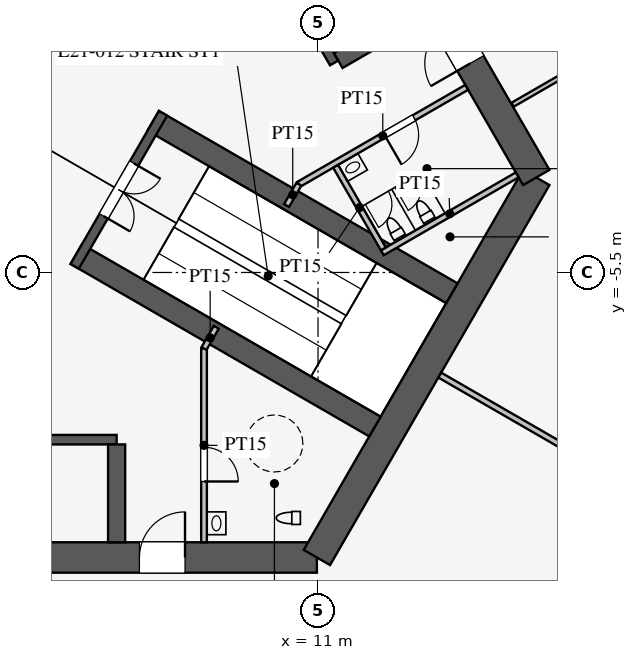
"""IFC4 building model, lengths in metres.
Left out: names, types, materials, properties, quantities, classifications, styles, units other than length and angle.
Written with IfcOpenShell. Run it as: python <this file> out.ifc"""

import sys

from ifc_helpers import new_model, si_unit, direction, frame, frame_2d, origin, place, context, subcontext, project, spatial, rectangle, extrude, element, fill, save


model = new_model("IFC4")
c1 = context("Model", 3, precision=1e-05, world=origin(), true_north=direction((0.0, 1.0)))
c2 = subcontext(c1, "Body", "Model", "MODEL_VIEW")
j1 = project(units=[si_unit("LENGTHUNIT", "METRE"), si_unit("PLANEANGLEUNIT", "RADIAN")], contexts=[c1])
p1 = place(None, origin())
s1 = spatial("IfcSite", under=j1, at=p1, CompositionType="ELEMENT")
p2 = place(p1, origin())
s2 = spatial("IfcBuilding", under=s1, at=p2, CompositionType="ELEMENT")
p3 = place(p2, frame((0.0, 0.0, 92.1)))
s3 = spatial("IfcBuildingStorey", under=s2, at=p3, CompositionType="ELEMENT", Elevation=92.1)
p4 = place(p3, frame((-10.97, -13.0, 0.0), z_axis=(0.0, 0.0, 1.0), x_axis=(1.0, 0.0, 0.0)))
e1 = element("IfcWall", 1, at=p4, inside=s3, PredefinedType="SHEAR", context=c2, shape_type="SweptSolid", body=[
    extrude(rectangle(XDim=21.939, YDim=0.8, at=frame_2d((10.97, 0.0))), origin(), (0.0, 0.0, 1.0), 6.0),
])
p5 = place(p4, frame((17.27, 0.0, 0.0)))
e2 = element("IfcOpeningElement", 2, at=p5, cuts=e1, PredefinedType="OPENING", context=c2, shape_type="SweptSolid", body=[
    extrude(rectangle(XDim=1.2, YDim=2.1, at=frame_2d((0.6, 1.05))), frame((0.0, 0.41, 0.0), z_axis=(0.0, -1.0, 0.0), x_axis=(1.0, 0.0, 0.0)), (0.0, 0.0, 1.0), 0.82),
])
p6 = place(p4, frame((3.47, 0.0, 0.0)))
e3 = element("IfcOpeningElement", 3, at=p6, cuts=e1, PredefinedType="OPENING", context=c2, shape_type="SweptSolid", body=[
    extrude(rectangle(XDim=1.2, YDim=2.1, at=frame_2d((0.6, 1.05))), frame((0.0, 0.41, 0.0), z_axis=(0.0, -1.0, 0.0), x_axis=(1.0, 0.0, 0.0)), (0.0, 0.0, 1.0), 0.82),
])
p7 = place(p3, frame((10.97, -13.0, 0.0), z_axis=(0.0, 0.0, 1.0), x_axis=(0.499995765644, 0.866027848477, 0.0)))
e4 = element("IfcWall", 4, at=p7, inside=s3, PredefinedType="SHEAR", context=c2, shape_type="SweptSolid", body=[
    extrude(rectangle(XDim=11.547, YDim=0.8, at=frame_2d((5.773, 0.0))), origin(), (0.0, 0.0, 1.0), 6.0),
])
p8 = place(p3, frame((16.743, -3.0, 0.0), z_axis=(0.0, 0.0, 1.0), x_axis=(-0.500002442456, 0.866023993627, 0.0)))
e5 = element("IfcWall", 5, at=p8, inside=s3, PredefinedType="SHEAR", context=c2, shape_type="SweptSolid", body=[
    extrude(rectangle(XDim=21.939, YDim=0.8, at=frame_2d((10.97, 0.0))), origin(), (0.0, 0.0, 1.0), 6.0),
])
p9 = place(p8, frame((17.27, 0.0, 0.0)))
e6 = element("IfcOpeningElement", 6, at=p9, cuts=e5, PredefinedType="OPENING", context=c2, shape_type="SweptSolid", body=[
    extrude(rectangle(XDim=1.2, YDim=2.1, at=frame_2d((0.6, 1.05))), frame((0.0, 0.41, 0.0), z_axis=(0.0, -1.0, 0.0), x_axis=(1.0, 0.0, 0.0)), (0.0, 0.0, 1.0), 0.82),
])
p10 = place(p8, frame((3.47, 0.0, 0.0)))
e7 = element("IfcOpeningElement", 7, at=p10, cuts=e5, PredefinedType="OPENING", context=c2, shape_type="SweptSolid", body=[
    extrude(rectangle(XDim=1.2, YDim=2.1, at=frame_2d((0.6, 1.05))), frame((0.0, 0.41, 0.0), z_axis=(0.0, -1.0, 0.0), x_axis=(1.0, 0.0, 0.0)), (0.0, 0.0, 1.0), 0.82),
])
p11 = place(p3, frame((-5.7, -9.9, 0.0), z_axis=(0.0, 0.0, 1.0), x_axis=(1.0, 0.0, 0.0)))
e8 = element("IfcWall", 8, at=p11, inside=s3, PredefinedType="SHEAR", context=c2, shape_type="SweptSolid", body=[
    extrude(rectangle(XDim=11.4, YDim=0.25, at=frame_2d((5.7, 0.0))), origin(), (0.0, 0.0, 1.0), 6.0),
])
p12 = place(p3, frame((5.7, -10.025, 0.0), z_axis=(0.0, 0.0, 1.0), x_axis=(0.0, -1.0, 0.0)))
e9 = element("IfcWall", 9, at=p12, inside=s3, PredefinedType="SHEAR", context=c2, shape_type="SweptSolid", body=[
    extrude(rectangle(XDim=2.575, YDim=0.45, at=frame_2d((1.288, 0.0))), origin(), (0.0, 0.0, 1.0), 6.0),
])
p13 = place(p3, frame((11.424, 0.014, 0.0), z_axis=(0.0, 0.0, 1.0), x_axis=(-0.500001763848, 0.866024385424, 0.0)))
e10 = element("IfcWall", 10, at=p13, inside=s3, PredefinedType="SHEAR", context=c2, shape_type="SweptSolid", body=[
    extrude(rectangle(XDim=11.4, YDim=0.25, at=frame_2d((5.7, 0.0))), origin(), (0.0, 0.0, 1.0), 6.0),
])
p14 = place(p3, frame((11.532, 0.076, 0.0), z_axis=(0.0, 0.0, 1.0), x_axis=(0.866005588531, 0.500034319456, 0.0)))
e11 = element("IfcWall", 11, at=p14, inside=s3, PredefinedType="SHEAR", context=c2, shape_type="SweptSolid", body=[
    extrude(rectangle(XDim=2.575, YDim=0.45, at=frame_2d((1.288, 0.0))), origin(), (0.0, 0.0, 1.0), 6.0),
])
for number, where, z_axis, x_axis in (
    (12, (4.638, -5.016, 0.0), (0.0, 0.0, 1.0), (0.866, -0.5, 0.0)),
    (13, (6.663, -1.509, 0.0), (0.0, 0.0, 1.0), (0.866, -0.5, 0.0)),
):
    element("IfcWall", number, at=place(p3, frame(where, z_axis=z_axis, x_axis=x_axis)), inside=s3, PredefinedType="SHEAR", context=c2, shape_type="SweptSolid", body=[
        extrude(rectangle(XDim=9.075, YDim=0.6, at=frame_2d((4.538, 0.0))), origin(), (0.0, 0.0, 1.0), 6.0),
    ])
p15 = place(p3, frame((4.597, -5.339, 0.0), z_axis=(0.0, 0.0, 1.0), x_axis=(0.499984536904, 0.866034331223, 0.0)))
e14 = element("IfcWall", 14, at=p15, inside=s3, PredefinedType="SHEAR", context=c2, shape_type="SweptSolid", body=[
    extrude(rectangle(XDim=4.65, YDim=0.25, at=frame_2d((2.325, 0.0))), origin(), (0.0, 0.0, 1.0), 6.0),
])
p16 = place(p15, frame((1.525, 0.0, 0.0)))
e15 = element("IfcOpeningElement", 15, at=p16, cuts=e14, PredefinedType="OPENING", context=c2, shape_type="SweptSolid", body=[
    extrude(rectangle(XDim=1.6, YDim=2.1, at=frame_2d((0.8, 1.05))), frame((0.0, 0.135, 0.0), z_axis=(0.0, -1.0, 0.0), x_axis=(1.0, 0.0, 0.0)), (0.0, 0.0, 1.0), 0.27),
])
p17 = place(p3, frame((8.0, -7.5, 0.0), z_axis=(0.0, 0.0, 1.0), x_axis=(0.0, -1.0, 0.0)))
e16 = element("IfcWall", 16, at=p17, inside=s3, PredefinedType="PARTITIONING", context=c2, shape_type="SweptSolid", body=[
    extrude(rectangle(XDim=5.1, YDim=0.15, at=frame_2d((2.55, 0.0))), origin(), (0.0, 0.0, 1.0), 5.8),
])
p18 = place(p17, frame((2.6, 0.0, 0.0)))
e17 = element("IfcOpeningElement", 17, at=p18, cuts=e16, PredefinedType="OPENING", context=c2, shape_type="SweptSolid", body=[
    extrude(rectangle(XDim=0.9, YDim=2.1, at=frame_2d((0.45, 1.05))), frame((0.0, 0.085, 0.0), z_axis=(0.0, -1.0, 0.0), x_axis=(1.0, 0.0, 0.0)), (0.0, 0.0, 1.0), 0.17),
])
p19 = place(p3, frame((10.495, -3.178, 0.0), z_axis=(0.0, 0.0, 1.0), x_axis=(0.86602216432, 0.500005610874, 0.0)))
e18 = element("IfcWall", 18, at=p19, inside=s3, PredefinedType="PARTITIONING", context=c2, shape_type="SweptSolid", body=[
    extrude(rectangle(XDim=5.1, YDim=0.15, at=frame_2d((2.55, 0.0))), origin(), (0.0, 0.0, 1.0), 5.8),
])
p20 = place(p19, frame((2.6, 0.0, 0.0)))
e19 = element("IfcOpeningElement", 19, at=p20, cuts=e18, PredefinedType="OPENING", context=c2, shape_type="SweptSolid", body=[
    extrude(rectangle(XDim=0.9, YDim=2.1, at=frame_2d((0.45, 1.05))), frame((0.0, 0.085, 0.0), z_axis=(0.0, -1.0, 0.0), x_axis=(1.0, 0.0, 0.0)), (0.0, 0.0, 1.0), 0.17),
])
for number, where, z_axis, x_axis in (
    (20, (8.0, -7.5, 0.0), (0.0, 0.0, 1.0), (0.5, 0.866, 0.0)),
    (21, (10.495, -3.178, 0.0), (0.0, 0.0, 1.0), (-0.5, -0.866, 0.0)),
):
    element("IfcWall", number, at=place(p3, frame(where, z_axis=z_axis, x_axis=x_axis)), inside=s3, PredefinedType="PARTITIONING", context=c2, shape_type="SweptSolid", body=[
        extrude(rectangle(XDim=0.645, YDim=0.15, at=frame_2d((0.323, 0.0))), origin(), (0.0, 0.0, 1.0), 5.8),
    ])
p21 = place(p3, frame((12.691, -4.982, 0.0), z_axis=(0.0, 0.0, 1.0), x_axis=(0.8660249478, 0.500000789788, 0.0)))
e22 = element("IfcWall", 22, at=p21, inside=s3, PredefinedType="PARTITIONING", context=c2, shape_type="SweptSolid", body=[
    extrude(rectangle(XDim=4.1, YDim=0.15, at=frame_2d((2.05, 0.0))), origin(), (0.0, 0.0, 1.0), 5.8),
])
p22 = place(p3, frame((11.464, -2.706, 0.0), z_axis=(0.0, 0.0, 1.0), x_axis=(0.50001992892, -0.866013897511, 0.0)))
e23 = element("IfcWall", 23, at=p22, inside=s3, PredefinedType="PARTITIONING", context=c2, shape_type="SweptSolid", body=[
    extrude(rectangle(XDim=2.51, YDim=0.15, at=frame_2d((1.255, 0.0))), origin(), (0.0, 0.0, 1.0), 5.8),
])
p23 = place(p3, frame((14.203, -8.2, 0.0), z_axis=(0.0, 0.0, 1.0), x_axis=(0.866024668836, -0.500001272966, 0.0)))
e24 = element("IfcWall", 24, at=p23, inside=s3, PredefinedType="PARTITIONING", context=c2, shape_type="SweptSolid", body=[
    extrude(rectangle(XDim=16.65, YDim=0.15, at=frame_2d((8.325, 0.0))), origin(), (0.0, 0.0, 1.0), 4.1),
])
p24 = place(p3, frame((16.122, -1.084, 0.0), z_axis=(0.0, 0.0, 1.0), x_axis=(0.866023947468, 0.500002522405, 0.0)))
e25 = element("IfcWall", 25, at=p24, inside=s3, PredefinedType="PARTITIONING", context=c2, shape_type="SweptSolid", body=[
    extrude(rectangle(XDim=11.771, YDim=0.12, at=frame_2d((5.886, 0.0))), origin(), (0.0, 0.0, 1.0), 2.9),
])
p25 = place(p24, frame((2.5, 0.0, 0.0)))
e26 = element("IfcOpeningElement", 26, at=p25, cuts=e25, PredefinedType="OPENING", context=c2, shape_type="SweptSolid", body=[
    extrude(rectangle(XDim=1.8, YDim=2.1, at=frame_2d((0.9, 1.05))), frame((0.0, 0.07, 0.0), z_axis=(0.0, -1.0, 0.0), x_axis=(1.0, 0.0, 0.0)), (0.0, 0.0, 1.0), 0.14),
])
p26 = place(p24, frame((7.6, 0.0, 0.0)))
e27 = element("IfcOpeningElement", 27, at=p26, cuts=e25, PredefinedType="OPENING", context=c2, shape_type="SweptSolid", body=[
    extrude(rectangle(XDim=1.8, YDim=2.1, at=frame_2d((0.9, 1.05))), frame((0.0, 0.07, 0.0), z_axis=(0.0, -1.0, 0.0), x_axis=(1.0, 0.0, 0.0)), (0.0, 0.0, 1.0), 0.14),
])
p27 = place(p18, origin())
e28 = element("IfcDoor", 28, at=p27, inside=s3, OperationType="SINGLE_SWING_RIGHT", PredefinedType="DOOR", context=c2, shape_type="SweptSolid", body=[
    extrude(rectangle(XDim=0.9, YDim=2.1, at=frame_2d((0.45, 1.05))), frame((0.0, 0.025, 0.0), z_axis=(0.0, -1.0, 0.0), x_axis=(1.0, 0.0, 0.0)), (0.0, 0.0, 1.0), 0.05),
])
fill(e17, e28)
p28 = place(p20, frame((0.9, 0.0, 0.0), z_axis=(0.0, 0.0, 1.0), x_axis=(-1.0, 0.0, 0.0)))
e29 = element("IfcDoor", 29, at=p28, inside=s3, OperationType="SINGLE_SWING_RIGHT", PredefinedType="DOOR", context=c2, shape_type="SweptSolid", body=[
    extrude(rectangle(XDim=0.9, YDim=2.1, at=frame_2d((0.45, 1.05))), frame((0.0, 0.025, 0.0), z_axis=(0.0, -1.0, 0.0), x_axis=(1.0, 0.0, 0.0)), (0.0, 0.0, 1.0), 0.05),
])
fill(e19, e29)
p29 = place(p16, frame((1.6, 0.0, 0.0), z_axis=(0.0, 0.0, 1.0), x_axis=(-1.0, 0.0, 0.0)))
e30 = element("IfcDoor", 30, at=p29, inside=s3, OperationType="DOUBLE_DOOR_SINGLE_SWING", PredefinedType="DOOR", context=c2, shape_type="SweptSolid", body=[
    extrude(rectangle(XDim=1.6, YDim=2.1, at=frame_2d((0.8, 1.05))), frame((0.0, 0.025, 0.0), z_axis=(0.0, -1.0, 0.0), x_axis=(1.0, 0.0, 0.0)), (0.0, 0.0, 1.0), 0.05),
])
fill(e15, e30)
p30 = place(p5, origin())
e31 = element("IfcDoor", 31, at=p30, inside=s3, OperationType="SINGLE_SWING_RIGHT", PredefinedType="DOOR", context=c2, shape_type="SweptSolid", body=[
    extrude(rectangle(XDim=1.2, YDim=2.1, at=frame_2d((0.6, 1.05))), frame((0.0, 0.025, 0.0), z_axis=(0.0, -1.0, 0.0), x_axis=(1.0, 0.0, 0.0)), (0.0, 0.0, 1.0), 0.05),
])
fill(e2, e31)
p31 = place(p10, origin())
e32 = element("IfcDoor", 32, at=p31, inside=s3, OperationType="SINGLE_SWING_LEFT", PredefinedType="DOOR", context=c2, shape_type="SweptSolid", body=[
    extrude(rectangle(XDim=1.2, YDim=2.1, at=frame_2d((0.6, 1.05))), frame((0.0, 0.025, 0.0), z_axis=(0.0, -1.0, 0.0), x_axis=(1.0, 0.0, 0.0)), (0.0, 0.0, 1.0), 0.05),
])
fill(e7, e32)
save(model, sys.argv[1])
